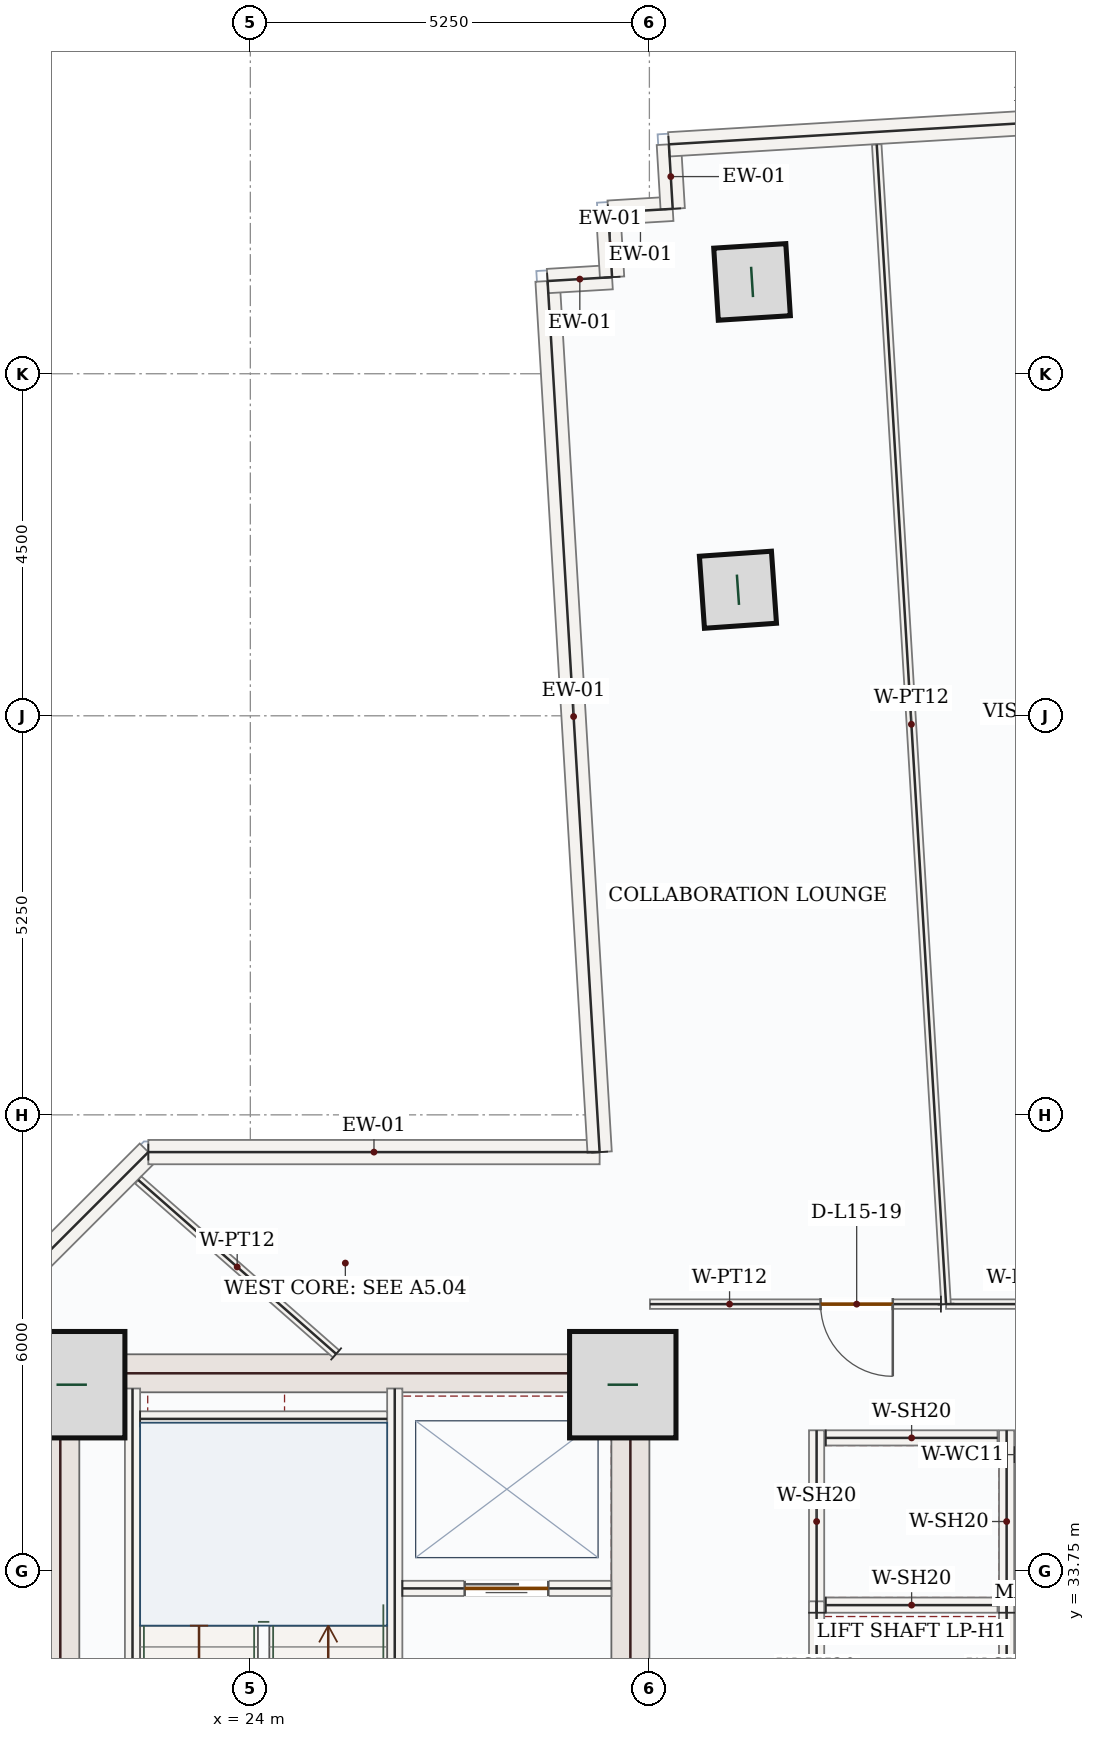
"""IFC4 building model, lengths in metres.
Left out: names, types, materials, properties, quantities, classifications, styles, units other than length and angle.
Written with IfcOpenShell. Run it as: python <this file> out.ifc"""

import sys

from ifc_helpers import new_model, si_unit, direction, frame, frame_2d, origin, origin_2d, place, context, subcontext, project, spatial, rectangle, hollow_rectangle, extrude, source, transform, mapped, element, fill, save


model = new_model("IFC4")
c1 = context("Model", 3, precision=1e-05, world=origin(), true_north=direction((0.0, 1.0)))
c2 = subcontext(c1, "Body", "Model", "MODEL_VIEW")
j1 = project(units=[si_unit("LENGTHUNIT", "METRE"), si_unit("PLANEANGLEUNIT", "RADIAN")], contexts=[c1])
p1 = place(None, origin())
s1 = spatial("IfcSite", under=j1, at=p1, CompositionType="ELEMENT")
p2 = place(p1, origin())
s2 = spatial("IfcBuilding", under=s1, at=p2, CompositionType="ELEMENT")
p3 = place(p2, frame((0.0, 0.0, 71.1)))
s3 = spatial("IfcBuildingStorey", under=s2, at=p3, CompositionType="ELEMENT", Elevation=71.1)
m1 = source(origin(), c2, "Body", "SweptSolid", [
    extrude(rectangle(XDim=8.55, YDim=0.5, at=frame_2d((4.275, 0.0))), origin(), (0.0, 0.0, 1.0), 3.95),
])
p4 = place(p3, frame((21.5, 28.05, 0.0), z_axis=(0.0, 0.0, 1.0), x_axis=(0.0, 1.0, 0.0)))
e1 = element("IfcWall", 1, at=p4, inside=s3, PredefinedType="SHEAR", context=c2, shape_type="MappedRepresentation", body=[
    mapped(m1, transform((0.0, 0.0, 0.0), x_axis=(1.0, 0.0, 0.0), y_axis=(0.0, 1.0, 0.0), z_axis=(0.0, 0.0, 1.0), scale=1.0)),
])
p5 = place(p3, frame((29.0, 28.05, 0.0), z_axis=(0.0, 0.0, 1.0), x_axis=(0.0, 1.0, 0.0)))
e2 = element("IfcWall", 2, at=p5, inside=s3, PredefinedType="SHEAR", context=c2, shape_type="SweptSolid", body=[
    extrude(rectangle(XDim=8.55, YDim=0.5, at=frame_2d((4.275, 0.0))), origin(), (0.0, 0.0, 1.0), 3.95),
])
p6 = place(p5, frame((1.5, 0.0, 0.0)))
e3 = element("IfcOpeningElement", 3, at=p6, cuts=e2, PredefinedType="OPENING", context=c2, shape_type="SweptSolid", body=[
    extrude(rectangle(XDim=1.1, YDim=2.2, at=frame_2d((0.55, 1.1))), frame((0.0, 0.26, 0.0), z_axis=(0.0, -1.0, 0.0), x_axis=(1.0, 0.0, 0.0)), (0.0, 0.0, 1.0), 0.52),
])
m2 = source(origin(), c2, "Body", "SweptSolid", [
    extrude(rectangle(XDim=7.0, YDim=0.5, at=frame_2d((3.5, 0.0))), origin(), (0.0, 0.0, 1.0), 3.95),
])
p7 = place(p3, frame((21.75, 36.35, 0.0), z_axis=(0.0, 0.0, 1.0), x_axis=(1.0, 0.0, 0.0)))
e4 = element("IfcWall", 4, at=p7, inside=s3, PredefinedType="SHEAR", context=c2, shape_type="MappedRepresentation", body=[
    mapped(m2, transform((0.0, 0.0, 0.0), x_axis=(1.0, 0.0, 0.0), y_axis=(0.0, 1.0, 0.0), z_axis=(0.0, 0.0, 1.0), scale=1.0)),
])
m3 = source(origin(), c2, "Body", "SweptSolid", [
    extrude(rectangle(XDim=1.4, YDim=1.4, at=origin_2d()), origin(), (0.0, 0.0, 1.0), 4.2),
])
for number, where, z_axis, x_axis in (
    (5, (21.65, 36.2, 0.0), (0.0, 0.0, 1.0), (1.0, 0.0, 0.0)),
    (6, (28.9, 36.2, 0.0), (0.0, 0.0, 1.0), (1.0, 0.0, 0.0)),
):
    element("IfcColumn", number, at=place(p3, frame(where, z_axis=z_axis, x_axis=x_axis)), inside=s3, PredefinedType="COLUMN", context=c2, shape_type="MappedRepresentation", body=[
        mapped(m3, transform((0.0, 0.0, 0.0), x_axis=(1.0, 0.0, 0.0), y_axis=(0.0, 1.0, 0.0), z_axis=(0.0, 0.0, 1.0), scale=1.0)),
    ])
m4 = source(origin(), c2, "Body", "SweptSolid", [
    extrude(hollow_rectangle(XDim=0.95, YDim=0.95, WallThickness=0.05, at=origin_2d()), origin(), (0.0, 0.0, 1.0), 4.2),
])
for number, where, z_axis, x_axis in (
    (7, (30.415, 46.658, 0.0), (0.0, 0.0, 1.0), (-0.07, 0.998, 0.0)),
    (8, (30.601, 50.708, 0.0), (0.0, 0.0, 1.0), (-0.063, 0.998, 0.0)),
):
    element("IfcColumn", number, at=place(p3, frame(where, z_axis=z_axis, x_axis=x_axis)), inside=s3, PredefinedType="COLUMN", context=c2, shape_type="MappedRepresentation", body=[
        mapped(m4, transform((0.0, 0.0, 0.0), x_axis=(1.0, 0.0, 0.0), y_axis=(0.0, 1.0, 0.0), z_axis=(0.0, 0.0, 1.0), scale=1.0)),
    ])
m5 = source(origin(), c2, "Body", "SweptSolid", [
    extrude(rectangle(XDim=5.258, YDim=0.32, at=frame_2d((2.629, 0.0))), origin(), (0.0, 0.0, 1.0), 3.95),
])
p8 = place(p3, frame((18.94, 35.542, 0.0), z_axis=(0.0, 0.0, 1.0), x_axis=(0.707106781187, 0.707106781187, 0.0)))
e9 = element("IfcWall", 9, at=p8, inside=s3, PredefinedType="SOLIDWALL", context=c2, shape_type="MappedRepresentation", body=[
    mapped(m5, transform((0.0, 0.0, 0.0), x_axis=(1.0, 0.0, 0.0), y_axis=(0.0, 1.0, 0.0), z_axis=(0.0, 0.0, 1.0), scale=1.0)),
])
m6 = source(origin(), c2, "Body", "SweptSolid", [
    extrude(rectangle(XDim=5.938, YDim=0.32, at=frame_2d((2.969, 0.0))), origin(), (0.0, 0.0, 1.0), 3.95),
])
p9 = place(p3, frame((22.658, 39.26, 0.0), z_axis=(0.0, 0.0, 1.0), x_axis=(1.0, 0.0, 0.0)))
e10 = element("IfcWall", 10, at=p9, inside=s3, PredefinedType="SOLIDWALL", context=c2, shape_type="MappedRepresentation", body=[
    mapped(m6, transform((0.0, 0.0, 0.0), x_axis=(1.0, 0.0, 0.0), y_axis=(0.0, 1.0, 0.0), z_axis=(0.0, 0.0, 1.0), scale=1.0)),
])
m7 = source(origin(), c2, "Body", "SweptSolid", [
    extrude(rectangle(XDim=11.48, YDim=0.32, at=frame_2d((5.74, 0.0))), origin(), (0.0, 0.0, 1.0), 3.95),
])
p10 = place(p3, frame((28.595, 39.26, 0.0), z_axis=(0.0, 0.0, 1.0), x_axis=(-0.059651994121, 0.998219234235, 0.0)))
e11 = element("IfcWall", 11, at=p10, inside=s3, PredefinedType="SOLIDWALL", context=c2, shape_type="MappedRepresentation", body=[
    mapped(m7, transform((0.0, 0.0, 0.0), x_axis=(1.0, 0.0, 0.0), y_axis=(0.0, 1.0, 0.0), z_axis=(0.0, 0.0, 1.0), scale=1.0)),
])
m8 = source(origin(), c2, "Body", "SweptSolid", [
    extrude(rectangle(XDim=0.85, YDim=0.32, at=frame_2d((0.425, 0.0))), origin(), (0.0, 0.0, 1.0), 3.95),
])
for number, where, z_axis, x_axis in (
    (12, (27.911, 50.72, 0.0), (0.0, 0.0, 1.0), (0.998, 0.06, 0.0)),
    (13, (28.759, 50.771, 0.0), (0.0, 0.0, 1.0), (-0.059, 0.998, 0.0)),
    (14, (28.708, 51.619, 0.0), (0.0, 0.0, 1.0), (0.998, 0.06, 0.0)),
    (15, (29.557, 51.67, 0.0), (0.0, 0.0, 1.0), (-0.06, 0.998, 0.0)),
):
    element("IfcWall", number, at=place(p3, frame(where, z_axis=z_axis, x_axis=x_axis)), inside=s3, PredefinedType="SOLIDWALL", context=c2, shape_type="MappedRepresentation", body=[
        mapped(m8, transform((0.0, 0.0, 0.0), x_axis=(1.0, 0.0, 0.0), y_axis=(0.0, 1.0, 0.0), z_axis=(0.0, 0.0, 1.0), scale=1.0)),
    ])
m9 = source(origin(), c2, "Body", "SweptSolid", [
    extrude(rectangle(XDim=9.92, YDim=0.32, at=frame_2d((4.96, 0.0))), origin(), (0.0, 0.0, 1.0), 3.95),
])
p11 = place(p3, frame((29.506, 52.518, 0.0), z_axis=(0.0, 0.0, 1.0), x_axis=(0.998218942745, 0.059656871726, 0.0)))
e16 = element("IfcWall", 16, at=p11, inside=s3, PredefinedType="SOLIDWALL", context=c2, shape_type="MappedRepresentation", body=[
    mapped(m9, transform((0.0, 0.0, 0.0), x_axis=(1.0, 0.0, 0.0), y_axis=(0.0, 1.0, 0.0), z_axis=(0.0, 0.0, 1.0), scale=1.0)),
])
m10 = source(origin(), c2, "Body", "SweptSolid", [
    extrude(rectangle(XDim=7.87, YDim=0.2, at=frame_2d((3.935, 0.0))), origin(), (0.0, 0.0, 1.0), 3.95),
])
p12 = place(p3, frame((22.45, 28.28, 0.0), z_axis=(0.0, 0.0, 1.0), x_axis=(0.0, 1.0, 0.0)))
e17 = element("IfcWall", 17, at=p12, inside=s3, PredefinedType="SOLIDWALL", context=c2, shape_type="MappedRepresentation", body=[
    mapped(m10, transform((0.0, 0.0, 0.0), x_axis=(1.0, 0.0, 0.0), y_axis=(0.0, 1.0, 0.0), z_axis=(0.0, 0.0, 1.0), scale=1.0)),
])
p13 = place(p3, frame((25.9, 28.15, 0.0), z_axis=(0.0, 0.0, 1.0), x_axis=(0.0, 1.0, 0.0)))
e18 = element("IfcWall", 18, at=p13, inside=s3, PredefinedType="SOLIDWALL", context=c2, shape_type="SweptSolid", body=[
    extrude(rectangle(XDim=8.0, YDim=0.2, at=frame_2d((4.0, 0.0))), origin(), (0.0, 0.0, 1.0), 3.95),
])
p14 = place(p13, frame((0.4, 0.0, 0.0)))
e19 = element("IfcOpeningElement", 19, at=p14, cuts=e18, PredefinedType="OPENING", context=c2, shape_type="SweptSolid", body=[
    extrude(rectangle(XDim=1.05, YDim=2.15, at=frame_2d((0.525, 1.075))), frame((0.0, 0.11, 0.0), z_axis=(0.0, -1.0, 0.0), x_axis=(1.0, 0.0, 0.0)), (0.0, 0.0, 1.0), 0.22),
])
m11 = source(origin(), c2, "Body", "SweptSolid", [
    extrude(rectangle(XDim=3.25, YDim=0.2, at=frame_2d((1.625, 0.0))), origin(), (0.0, 0.0, 1.0), 3.95),
])
p15 = place(p3, frame((22.55, 35.75, 0.0), z_axis=(0.0, 0.0, 1.0), x_axis=(1.0, 0.0, 0.0)))
e20 = element("IfcWall", 20, at=p15, inside=s3, PredefinedType="SOLIDWALL", context=c2, shape_type="MappedRepresentation", body=[
    mapped(m11, transform((0.0, 0.0, 0.0), x_axis=(1.0, 0.0, 0.0), y_axis=(0.0, 1.0, 0.0), z_axis=(0.0, 0.0, 1.0), scale=1.0)),
])
p16 = place(p3, frame((26.0, 33.52, 0.0), z_axis=(0.0, 0.0, 1.0), x_axis=(1.0, 0.0, 0.0)))
e21 = element("IfcWall", 21, at=p16, inside=s3, PredefinedType="SOLIDWALL", context=c2, shape_type="SweptSolid", body=[
    extrude(rectangle(XDim=2.75, YDim=0.2, at=frame_2d((1.375, 0.0))), origin(), (0.0, 0.0, 1.0), 3.95),
])
p17 = place(p16, frame((0.82, 0.0, 0.0)))
e22 = element("IfcOpeningElement", 22, at=p17, cuts=e21, PredefinedType="OPENING", context=c2, shape_type="SweptSolid", body=[
    extrude(rectangle(XDim=1.1, YDim=2.15, at=frame_2d((0.55, 1.075))), frame((0.0, 0.11, 0.0), z_axis=(0.0, -1.0, 0.0), x_axis=(1.0, 0.0, 0.0)), (0.0, 0.0, 1.0), 0.22),
])
m12 = source(origin(), c2, "Body", "SweptSolid", [
    extrude(rectangle(XDim=2.4, YDim=0.2, at=frame_2d((1.2, 0.0))), origin(), (0.0, 0.0, 1.0), 3.95),
])
for number, where, z_axis, x_axis in (
    (23, (31.45, 33.2, 0.0), (0.0, 0.0, 1.0), (0.0, 1.0, 0.0)),
    (24, (33.95, 33.2, 0.0), (0.0, 0.0, 1.0), (0.0, 1.0, 0.0)),
):
    element("IfcWall", number, at=place(p3, frame(where, z_axis=z_axis, x_axis=x_axis)), inside=s3, PredefinedType="SOLIDWALL", context=c2, shape_type="MappedRepresentation", body=[
        mapped(m12, transform((0.0, 0.0, 0.0), x_axis=(1.0, 0.0, 0.0), y_axis=(0.0, 1.0, 0.0), z_axis=(0.0, 0.0, 1.0), scale=1.0)),
    ])
m13 = source(origin(), c2, "Body", "SweptSolid", [
    extrude(rectangle(XDim=2.26, YDim=0.2, at=frame_2d((1.13, 0.0))), origin(), (0.0, 0.0, 1.0), 3.95),
])
for number, where, z_axis, x_axis in (
    (25, (31.57, 33.3, 0.0), (0.0, 0.0, 1.0), (1.0, 0.0, 0.0)),
    (26, (31.57, 35.5, 0.0), (0.0, 0.0, 1.0), (1.0, 0.0, 0.0)),
):
    element("IfcWall", number, at=place(p3, frame(where, z_axis=z_axis, x_axis=x_axis)), inside=s3, PredefinedType="SOLIDWALL", context=c2, shape_type="MappedRepresentation", body=[
        mapped(m13, transform((0.0, 0.0, 0.0), x_axis=(1.0, 0.0, 0.0), y_axis=(0.0, 1.0, 0.0), z_axis=(0.0, 0.0, 1.0), scale=1.0)),
    ])
for number, where, z_axis, x_axis in (
    (27, (31.45, 30.95, 0.0), (0.0, 0.0, 1.0), (0.0, 1.0, 0.0)),
    (28, (33.95, 30.95, 0.0), (0.0, 0.0, 1.0), (0.0, 1.0, 0.0)),
):
    element("IfcWall", number, at=place(p3, frame(where, z_axis=z_axis, x_axis=x_axis)), inside=s3, PredefinedType="SOLIDWALL", context=c2, shape_type="MappedRepresentation", body=[
        mapped(m12, transform((0.0, 0.0, 0.0), x_axis=(1.0, 0.0, 0.0), y_axis=(0.0, 1.0, 0.0), z_axis=(0.0, 0.0, 1.0), scale=1.0)),
    ])
p18 = place(p3, frame((34.055, 35.28, 0.0), z_axis=(0.0, 0.0, 1.0), x_axis=(1.0, 0.0, 0.0)))
e29 = element("IfcWall", 29, at=p18, inside=s3, PredefinedType="PARTITIONING", context=c2, shape_type="SweptSolid", body=[
    extrude(rectangle(XDim=1.285, YDim=0.115, at=frame_2d((0.643, 0.0))), origin(), (0.0, 0.0, 1.0), 3.95),
])
p19 = place(p18, frame((0.3, 0.0, 0.0)))
e30 = element("IfcOpeningElement", 30, at=p19, cuts=e29, PredefinedType="OPENING", context=c2, shape_type="SweptSolid", body=[
    extrude(rectangle(XDim=0.9, YDim=2.1, at=frame_2d((0.45, 1.05))), frame((0.0, 0.067, 0.0), z_axis=(0.0, -1.0, 0.0), x_axis=(1.0, 0.0, 0.0)), (0.0, 0.0, 1.0), 0.135),
])
p20 = place(p3, frame((36.932, 37.26, 0.0), z_axis=(0.0, 0.0, 1.0), x_axis=(-1.0, 0.0, 0.0)))
e31 = element("IfcWall", 31, at=p20, inside=s3, PredefinedType="PARTITIONING", context=c2, shape_type="SweptSolid", body=[
    extrude(rectangle(XDim=3.779, YDim=0.125, at=frame_2d((1.89, 0.0))), origin(), (0.0, 0.0, 1.0), 3.95),
])
p21 = place(p20, frame((0.622, 0.0, 0.0)))
e32 = element("IfcOpeningElement", 32, at=p21, cuts=e31, PredefinedType="OPENING", context=c2, shape_type="SweptSolid", body=[
    extrude(rectangle(XDim=0.95, YDim=2.15, at=frame_2d((0.475, 1.075))), frame((0.0, 0.073, 0.0), z_axis=(0.0, -1.0, 0.0), x_axis=(1.0, 0.0, 0.0)), (0.0, 0.0, 1.0), 0.145),
])
m14 = source(origin(), c2, "Body", "SweptSolid", [
    extrude(rectangle(XDim=15.283, YDim=0.125, at=frame_2d((7.642, 0.0))), origin(), (0.0, 0.0, 1.0), 3.95),
])
p22 = place(p3, frame((33.153, 37.26, 0.0), z_axis=(0.0, 0.0, 1.0), x_axis=(-0.059648121824, 0.99821946563, 0.0)))
e33 = element("IfcWall", 33, at=p22, inside=s3, PredefinedType="PARTITIONING", context=c2, shape_type="MappedRepresentation", body=[
    mapped(m14, transform((0.0, 0.0, 0.0), x_axis=(1.0, 0.0, 0.0), y_axis=(0.0, 1.0, 0.0), z_axis=(0.0, 0.0, 1.0), scale=1.0)),
])
p23 = place(p3, frame((33.085, 37.26, 0.0), z_axis=(0.0, 0.0, 1.0), x_axis=(-0.999999997966, -6.3783646e-05, 0.0)))
e34 = element("IfcWall", 34, at=p23, inside=s3, PredefinedType="PARTITIONING", context=c2, shape_type="SweptSolid", body=[
    extrude(rectangle(XDim=3.828, YDim=0.125, at=frame_2d((1.914, 0.0))), origin(), (0.0, 0.0, 1.0), 3.95),
])
p24 = place(p23, frame((0.633, 0.0, 0.0)))
e35 = element("IfcOpeningElement", 35, at=p24, cuts=e34, PredefinedType="OPENING", context=c2, shape_type="SweptSolid", body=[
    extrude(rectangle(XDim=0.95, YDim=2.15, at=frame_2d((0.475, 1.075))), frame((0.0, 0.073, 0.0), z_axis=(0.0, -1.0, 0.0), x_axis=(1.0, 0.0, 0.0)), (0.0, 0.0, 1.0), 0.145),
])
m15 = source(origin(), c2, "Body", "SweptSolid", [
    extrude(rectangle(XDim=3.467, YDim=0.125, at=frame_2d((1.733, 0.0))), origin(), (0.0, 0.0, 1.0), 3.95),
])
p25 = place(p3, frame((25.129, 36.605, 0.0), z_axis=(0.0, 0.0, 1.0), x_axis=(-0.751135268809, 0.66014832269, 0.0)))
e36 = element("IfcWall", 36, at=p25, inside=s3, PredefinedType="PARTITIONING", context=c2, shape_type="MappedRepresentation", body=[
    mapped(m15, transform((0.0, 0.0, 0.0), x_axis=(1.0, 0.0, 0.0), y_axis=(0.0, 1.0, 0.0), z_axis=(0.0, 0.0, 1.0), scale=1.0)),
])
m16 = source(origin(), c2, "Body", "SweptSolid", [
    extrude(rectangle(XDim=1.1, YDim=2.15, at=frame_2d((0.55, 1.075))), frame((0.0, 0.025, 0.0), z_axis=(0.0, -1.0, 0.0), x_axis=(1.0, 0.0, 0.0)), (0.0, 0.0, 1.0), 0.05),
])
p26 = place(p17, origin())
e37 = element("IfcDoor", 37, at=p26, inside=s3, OperationType="DOUBLE_DOOR_SLIDING", PredefinedType="DOOR", context=c2, shape_type="MappedRepresentation", body=[
    mapped(m16, transform((0.0, 0.0, 0.0), x_axis=(1.0, 0.0, 0.0), y_axis=(0.0, 1.0, 0.0), z_axis=(0.0, 0.0, 1.0), scale=1.0)),
])
fill(e22, e37)
m17 = source(origin(), c2, "Body", "SweptSolid", [
    extrude(rectangle(XDim=0.95, YDim=2.15, at=frame_2d((0.475, 1.075))), frame((0.0, 0.025, 0.0), z_axis=(0.0, -1.0, 0.0), x_axis=(1.0, 0.0, 0.0)), (0.0, 0.0, 1.0), 0.05),
])
p27 = place(p24, origin())
e38 = element("IfcDoor", 38, at=p27, inside=s3, OperationType="SINGLE_SWING_LEFT", PredefinedType="DOOR", context=c2, shape_type="MappedRepresentation", body=[
    mapped(m17, transform((0.0, 0.0, 0.0), x_axis=(1.0, 0.0, 0.0), y_axis=(0.0, 1.0, 0.0), z_axis=(0.0, 0.0, 1.0), scale=1.0)),
])
fill(e35, e38)
save(model, sys.argv[1])
